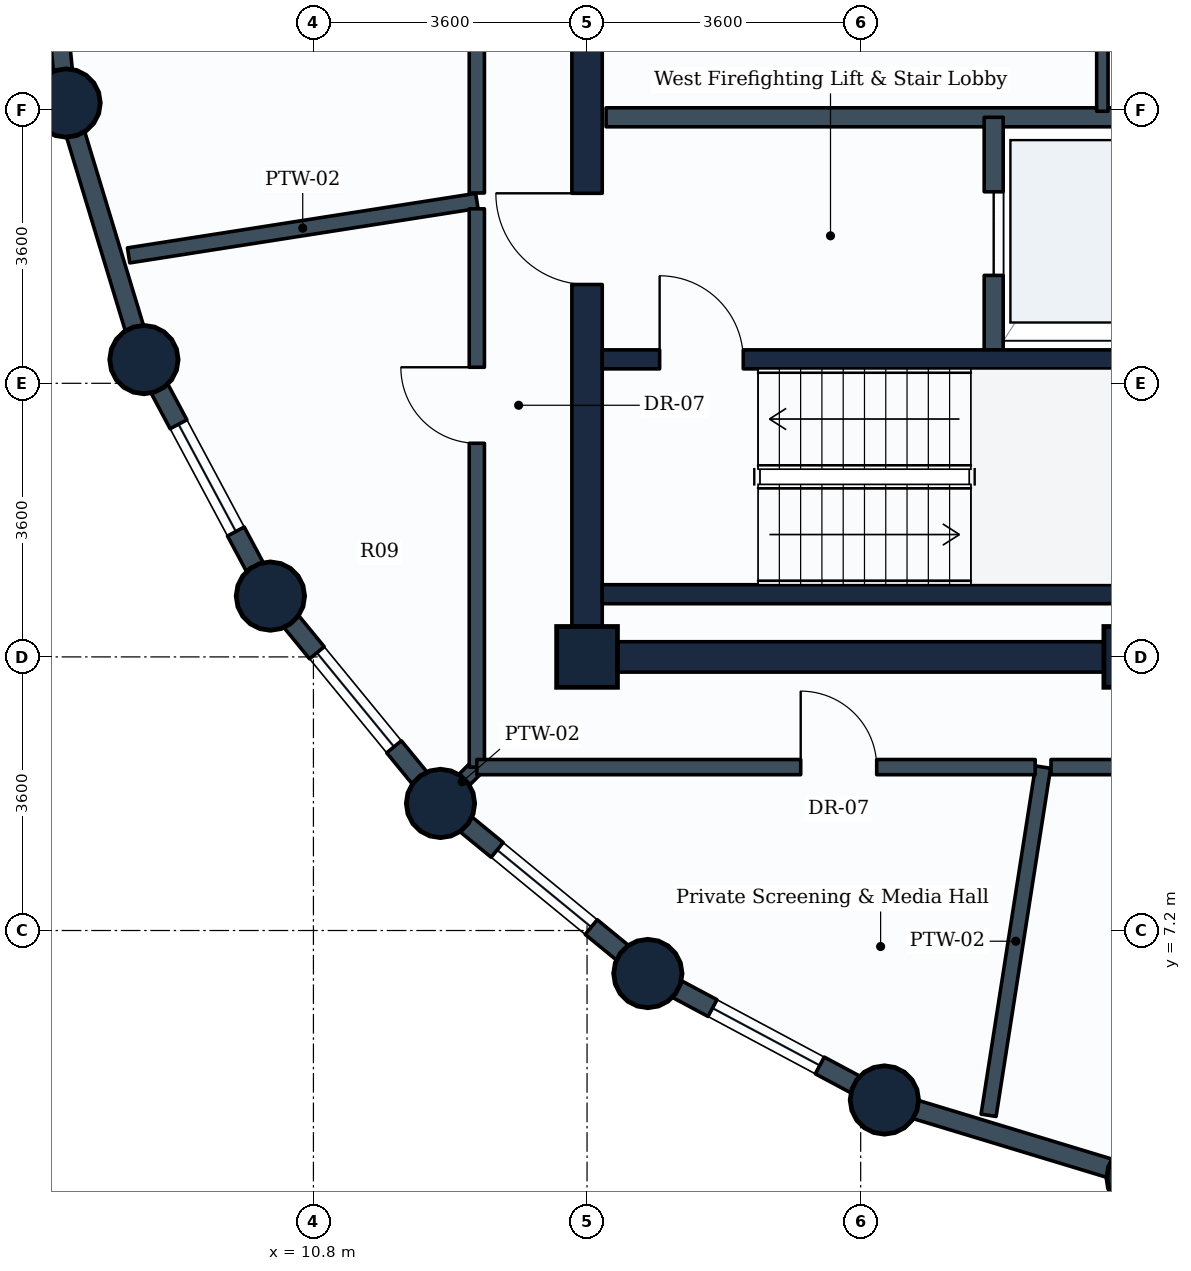
"""IFC4 building model, lengths in metres.
Left out: names, types, materials, properties, quantities, classifications, styles, units other than length and angle.
Written with IfcOpenShell. Run it as: python <this file> out.ifc"""

import sys

from ifc_helpers import new_model, si_unit, direction, frame, frame_2d, origin, origin_2d, place, context, subcontext, project, spatial, rectangle, circle, extrude, element, fill, save


model = new_model("IFC4")
c1 = context("Model", 3, precision=1e-05, world=origin(), true_north=direction((0.0, 1.0)))
c2 = subcontext(c1, "Body", "Model", "MODEL_VIEW")
j1 = project(units=[si_unit("LENGTHUNIT", "METRE"), si_unit("PLANEANGLEUNIT", "RADIAN")], contexts=[c1])
p1 = place(None, origin())
s1 = spatial("IfcSite", under=j1, at=p1, CompositionType="ELEMENT")
p2 = place(p1, origin())
s2 = spatial("IfcBuilding", under=s1, at=p2, CompositionType="ELEMENT")
p3 = place(p2, frame((0.0, 0.0, 224.6)))
s3 = spatial("IfcBuildingStorey", under=s2, at=p3, CompositionType="ELEMENT", Elevation=224.6)
for number, where, z_axis, x_axis in (
    (1, (7.546, 18.088, 0.0), (0.0, 0.0, 1.0), (1.0, 0.0, 0.0)),
    (2, (8.57, 14.712, 0.0), (0.0, 0.0, 1.0), (1.0, 0.0, 0.0)),
    (3, (10.234, 11.6, 0.0), (0.0, 0.0, 1.0), (1.0, 0.0, 0.0)),
    (4, (12.472, 8.872, 0.0), (0.0, 0.0, 1.0), (1.0, 0.0, 0.0)),
):
    element("IfcColumn", number, at=place(p3, frame(where, z_axis=z_axis, x_axis=x_axis)), inside=s3, PredefinedType="COLUMN", context=c2, shape_type="SweptSolid", body=[
        extrude(circle(Radius=0.45, at=origin_2d()), origin(), (0.0, 0.0, 1.0), 3.6),
    ])
p4 = place(p3, frame((14.4, 10.8, 0.0), z_axis=(0.0, 0.0, 1.0), x_axis=(1.0, 0.0, 0.0)))
e5 = element("IfcColumn", 5, at=p4, inside=s3, PredefinedType="COLUMN", context=c2, shape_type="SweptSolid", body=[
    extrude(rectangle(XDim=0.8, YDim=0.8, at=origin_2d()), origin(), (0.0, 0.0, 1.0), 3.6),
])
for number, where, z_axis, x_axis in (
    (6, (15.2, 6.634, 0.0), (0.0, 0.0, 1.0), (1.0, 0.0, 0.0)),
    (7, (18.312, 4.97, 0.0), (0.0, 0.0, 1.0), (1.0, 0.0, 0.0)),
):
    element("IfcColumn", number, at=place(p3, frame(where, z_axis=z_axis, x_axis=x_axis)), inside=s3, PredefinedType="COLUMN", context=c2, shape_type="SweptSolid", body=[
        extrude(circle(Radius=0.45, at=origin_2d()), origin(), (0.0, 0.0, 1.0), 3.6),
    ])
p5 = place(p3, frame((21.6, 10.8, 0.0), z_axis=(0.0, 0.0, 1.0), x_axis=(1.0, 0.0, 0.0)))
e8 = element("IfcColumn", 8, at=p5, inside=s3, PredefinedType="COLUMN", context=c2, shape_type="SweptSolid", body=[
    extrude(rectangle(XDim=0.8, YDim=0.8, at=origin_2d()), origin(), (0.0, 0.0, 1.0), 3.6),
])
p6 = place(p3, frame((21.688, 3.946, 0.0), z_axis=(0.0, 0.0, 1.0), x_axis=(1.0, 0.0, 0.0)))
e9 = element("IfcColumn", 9, at=p6, inside=s3, PredefinedType="COLUMN", context=c2, shape_type="SweptSolid", body=[
    extrude(circle(Radius=0.45, at=origin_2d()), origin(), (0.0, 0.0, 1.0), 3.6),
])
p7 = place(p3, frame((7.546, 18.088, 0.0), z_axis=(0.0, 0.0, 1.0), x_axis=(-0.09802417461, 0.995184033831, 0.0)))
e10 = element("IfcWall", 10, at=p7, inside=s3, PredefinedType="STANDARD", context=c2, shape_type="SweptSolid", body=[
    extrude(rectangle(XDim=3.529, YDim=0.25, at=frame_2d((1.765, 0.0))), origin(), (0.0, 0.0, 1.0), 2.83),
])
p8 = place(p7, frame((0.965, 0.0, 0.85)))
e11 = element("IfcOpeningElement", 11, at=p8, cuts=e10, PredefinedType="OPENING", context=c2, shape_type="SweptSolid", body=[
    extrude(rectangle(XDim=1.6, YDim=1.35, at=frame_2d((0.8, 0.675))), frame((0.0, 0.135, 0.0), z_axis=(0.0, -1.0, 0.0), x_axis=(1.0, 0.0, 0.0)), (0.0, 0.0, 1.0), 0.27),
])
p9 = place(p3, frame((8.57, 14.712, 0.0), z_axis=(0.0, 0.0, 1.0), x_axis=(-0.290305086481, 0.956934144423, 0.0)))
e12 = element("IfcWall", 12, at=p9, inside=s3, PredefinedType="STANDARD", context=c2, shape_type="SweptSolid", body=[
    extrude(rectangle(XDim=3.528, YDim=0.25, at=frame_2d((1.764, 0.0))), origin(), (0.0, 0.0, 1.0), 2.83),
])
p10 = place(p3, frame((10.234, 11.6, 0.0), z_axis=(0.0, 0.0, 1.0), x_axis=(-0.47151087309, 0.881860247748, 0.0)))
e13 = element("IfcWall", 13, at=p10, inside=s3, PredefinedType="STANDARD", context=c2, shape_type="SweptSolid", body=[
    extrude(rectangle(XDim=3.529, YDim=0.25, at=frame_2d((1.764, 0.0))), origin(), (0.0, 0.0, 1.0), 2.83),
])
p11 = place(p10, frame((0.964, 0.0, 0.85)))
e14 = element("IfcOpeningElement", 14, at=p11, cuts=e13, PredefinedType="OPENING", context=c2, shape_type="SweptSolid", body=[
    extrude(rectangle(XDim=1.6, YDim=1.35, at=frame_2d((0.8, 0.675))), frame((0.0, 0.135, 0.0), z_axis=(0.0, -1.0, 0.0), x_axis=(1.0, 0.0, 0.0)), (0.0, 0.0, 1.0), 0.27),
])
p12 = place(p3, frame((12.472, 8.872, 0.0), z_axis=(0.0, 0.0, 1.0), x_axis=(-0.634258295121, 0.773121216285, 0.0)))
e15 = element("IfcWall", 15, at=p12, inside=s3, PredefinedType="STANDARD", context=c2, shape_type="SweptSolid", body=[
    extrude(rectangle(XDim=3.529, YDim=0.25, at=frame_2d((1.764, 0.0))), origin(), (0.0, 0.0, 1.0), 2.83),
])
p13 = place(p12, frame((0.964, 0.0, 0.85)))
e16 = element("IfcOpeningElement", 16, at=p13, cuts=e15, PredefinedType="OPENING", context=c2, shape_type="SweptSolid", body=[
    extrude(rectangle(XDim=1.6, YDim=1.35, at=frame_2d((0.8, 0.675))), frame((0.0, 0.135, 0.0), z_axis=(0.0, -1.0, 0.0), x_axis=(1.0, 0.0, 0.0)), (0.0, 0.0, 1.0), 0.27),
])
p14 = place(p3, frame((15.2, 6.634, 0.0), z_axis=(0.0, 0.0, 1.0), x_axis=(-0.773121216285, 0.634258295121, 0.0)))
e17 = element("IfcWall", 17, at=p14, inside=s3, PredefinedType="STANDARD", context=c2, shape_type="SweptSolid", body=[
    extrude(rectangle(XDim=3.529, YDim=0.25, at=frame_2d((1.764, 0.0))), origin(), (0.0, 0.0, 1.0), 2.83),
])
p15 = place(p14, frame((0.964, 0.0, 0.85)))
e18 = element("IfcOpeningElement", 18, at=p15, cuts=e17, PredefinedType="OPENING", context=c2, shape_type="SweptSolid", body=[
    extrude(rectangle(XDim=1.6, YDim=1.35, at=frame_2d((0.8, 0.675))), frame((0.0, 0.135, 0.0), z_axis=(0.0, -1.0, 0.0), x_axis=(1.0, 0.0, 0.0)), (0.0, 0.0, 1.0), 0.27),
])
p16 = place(p3, frame((18.312, 4.97, 0.0), z_axis=(0.0, 0.0, 1.0), x_axis=(-0.881846862014, 0.471535907389, 0.0)))
e19 = element("IfcWall", 19, at=p16, inside=s3, PredefinedType="STANDARD", context=c2, shape_type="SweptSolid", body=[
    extrude(rectangle(XDim=3.529, YDim=0.25, at=frame_2d((1.765, 0.0))), origin(), (0.0, 0.0, 1.0), 2.83),
])
p17 = place(p16, frame((0.964, 0.0, 0.85)))
e20 = element("IfcOpeningElement", 20, at=p17, cuts=e19, PredefinedType="OPENING", context=c2, shape_type="SweptSolid", body=[
    extrude(rectangle(XDim=1.6, YDim=1.35, at=frame_2d((0.8, 0.675))), frame((0.0, 0.135, 0.0), z_axis=(0.0, -1.0, 0.0), x_axis=(1.0, 0.0, 0.0)), (0.0, 0.0, 1.0), 0.27),
])
p18 = place(p3, frame((21.688, 3.946, 0.0), z_axis=(0.0, 0.0, 1.0), x_axis=(-0.956953367403, 0.290241714123, 0.0)))
e21 = element("IfcWall", 21, at=p18, inside=s3, PredefinedType="STANDARD", context=c2, shape_type="SweptSolid", body=[
    extrude(rectangle(XDim=3.528, YDim=0.25, at=frame_2d((1.764, 0.0))), origin(), (0.0, 0.0, 1.0), 2.83),
])
p19 = place(p3, frame((14.4, 10.8, 0.0), z_axis=(0.0, 0.0, 1.0), x_axis=(1.0, 0.0, 0.0)))
e22 = element("IfcWall", 22, at=p19, inside=s3, PredefinedType="SHEAR", context=c2, shape_type="SweptSolid", body=[
    extrude(rectangle(XDim=18.0, YDim=0.4, at=frame_2d((9.0, 0.0))), origin(), (0.0, 0.0, 1.0), 3.35),
])
p20 = place(p3, frame((14.4, 10.8, 0.0), z_axis=(0.0, 0.0, 1.0), x_axis=(0.0, 1.0, 0.0)))
e23 = element("IfcWall", 23, at=p20, inside=s3, PredefinedType="SHEAR", context=c2, shape_type="SweptSolid", body=[
    extrude(rectangle(XDim=14.4, YDim=0.4, at=frame_2d((7.2, 0.0))), origin(), (0.0, 0.0, 1.0), 3.35),
])
p21 = place(p20, frame((11.05, 0.0, 0.0)))
e24 = element("IfcOpeningElement", 24, at=p21, cuts=e23, PredefinedType="OPENING", context=c2, shape_type="SweptSolid", body=[
    extrude(rectangle(XDim=1.1, YDim=2.1, at=frame_2d((0.55, 1.05))), frame((0.0, 0.21, 0.0), z_axis=(0.0, -1.0, 0.0), x_axis=(1.0, 0.0, 0.0)), (0.0, 0.0, 1.0), 0.42),
])
p22 = place(p20, frame((4.9, 0.0, 0.0)))
e25 = element("IfcOpeningElement", 25, at=p22, cuts=e23, PredefinedType="OPENING", context=c2, shape_type="SweptSolid", body=[
    extrude(rectangle(XDim=1.2, YDim=2.1, at=frame_2d((0.6, 1.05))), frame((0.0, 0.21, 0.0), z_axis=(0.0, -1.0, 0.0), x_axis=(1.0, 0.0, 0.0)), (0.0, 0.0, 1.0), 0.42),
])
p23 = place(p20, frame((8.15, 0.0, 0.0)))
e26 = element("IfcOpeningElement", 26, at=p23, cuts=e23, PredefinedType="OPENING", context=c2, shape_type="SweptSolid", body=[
    extrude(rectangle(XDim=0.9, YDim=2.1, at=frame_2d((0.45, 1.05))), frame((0.0, 0.21, 0.0), z_axis=(0.0, -1.0, 0.0), x_axis=(1.0, 0.0, 0.0)), (0.0, 0.0, 1.0), 0.42),
])
p24 = place(p3, frame((14.6, 11.625, 0.0), z_axis=(0.0, 0.0, 1.0), x_axis=(1.0, 0.0, 0.0)))
e27 = element("IfcWall", 27, at=p24, inside=s3, PredefinedType="SHEAR", context=c2, shape_type="SweptSolid", body=[
    extrude(rectangle(XDim=8.75, YDim=0.25, at=frame_2d((4.375, 0.0))), origin(), (0.0, 0.0, 1.0), 3.35),
])
p25 = place(p3, frame((14.6, 14.715, 0.0), z_axis=(0.0, 0.0, 1.0), x_axis=(1.0, 0.0, 0.0)))
e28 = element("IfcWall", 28, at=p25, inside=s3, PredefinedType="SHEAR", context=c2, shape_type="SweptSolid", body=[
    extrude(rectangle(XDim=8.75, YDim=0.25, at=frame_2d((4.375, 0.0))), origin(), (0.0, 0.0, 1.0), 3.35),
])
p26 = place(p25, frame((0.755, 0.0, 0.0)))
e29 = element("IfcOpeningElement", 29, at=p26, cuts=e28, PredefinedType="OPENING", context=c2, shape_type="SweptSolid", body=[
    extrude(rectangle(XDim=1.1, YDim=2.1, at=frame_2d((0.55, 1.05))), frame((0.0, 0.135, 0.0), z_axis=(0.0, -1.0, 0.0), x_axis=(1.0, 0.0, 0.0)), (0.0, 0.0, 1.0), 0.27),
])
p27 = place(p3, frame((14.65, 17.9, 0.0), z_axis=(0.0, 0.0, 1.0), x_axis=(1.0, 0.0, 0.0)))
e30 = element("IfcWall", 30, at=p27, inside=s3, PredefinedType="PARTITIONING", context=c2, shape_type="SweptSolid", body=[
    extrude(rectangle(XDim=7.15, YDim=0.25, at=frame_2d((3.575, 0.0))), origin(), (0.0, 0.0, 1.0), 3.335),
])
p28 = place(p3, frame((19.75, 14.84, 0.0), z_axis=(0.0, 0.0, 1.0), x_axis=(0.0, 1.0, 0.0)))
e31 = element("IfcWall", 31, at=p28, inside=s3, PredefinedType="PARTITIONING", context=c2, shape_type="SweptSolid", body=[
    extrude(rectangle(XDim=3.06, YDim=0.25, at=frame_2d((1.53, 0.0))), origin(), (0.0, 0.0, 1.0), 3.335),
])
p29 = place(p28, frame((0.98, 0.0, 0.0)))
e32 = element("IfcOpeningElement", 32, at=p29, cuts=e31, PredefinedType="OPENING", context=c2, shape_type="SweptSolid", body=[
    extrude(rectangle(XDim=1.1, YDim=2.1, at=frame_2d((0.55, 1.05))), frame((0.0, 0.135, 0.0), z_axis=(0.0, -1.0, 0.0), x_axis=(1.0, 0.0, 0.0)), (0.0, 0.0, 1.0), 0.27),
])
p30 = place(p3, frame((21.18, 17.98, 0.0), z_axis=(0.0, 0.0, 1.0), x_axis=(0.0, 1.0, 0.0)))
e33 = element("IfcWall", 33, at=p30, inside=s3, PredefinedType="PARTITIONING", context=c2, shape_type="SweptSolid", body=[
    extrude(rectangle(XDim=3.42, YDim=0.15, at=frame_2d((1.71, 0.0))), origin(), (0.0, 0.0, 1.0), 3.335),
])
p31 = place(p3, frame((12.95, 16.8, 0.0), z_axis=(0.0, 0.0, 1.0), x_axis=(-0.9879733582, -0.154624200844, 0.0)))
e34 = element("IfcWall", 34, at=p31, inside=s3, PredefinedType="PARTITIONING", context=c2, shape_type="SweptSolid", body=[
    extrude(rectangle(XDim=4.637, YDim=0.2, at=frame_2d((2.319, 0.0))), origin(), (0.0, 0.0, 1.0), 2.83),
])
p32 = place(p3, frame((12.95, 9.35, 0.0), z_axis=(0.0, 0.0, 1.0), x_axis=(-0.706883613527, -0.707329878435, 0.0)))
e35 = element("IfcWall", 35, at=p32, inside=s3, PredefinedType="PARTITIONING", context=c2, shape_type="SweptSolid", body=[
    extrude(rectangle(XDim=0.547, YDim=0.2, at=frame_2d((0.273, 0.0))), origin(), (0.0, 0.0, 1.0), 3.02),
])
p33 = place(p3, frame((20.4, 9.35, 0.0), z_axis=(0.0, 0.0, 1.0), x_axis=(-0.154564772307, -0.987982657318, 0.0)))
e36 = element("IfcWall", 36, at=p33, inside=s3, PredefinedType="PARTITIONING", context=c2, shape_type="SweptSolid", body=[
    extrude(rectangle(XDim=4.637, YDim=0.2, at=frame_2d((2.319, 0.0))), origin(), (0.0, 0.0, 1.0), 2.83),
])
p34 = place(p3, frame((12.95, 16.904, 0.0), z_axis=(0.0, 0.0, 1.0), x_axis=(0.0, 1.0, 0.0)))
e37 = element("IfcWall", 37, at=p34, inside=s3, PredefinedType="PARTITIONING", context=c2, shape_type="SweptSolid", body=[
    extrude(rectangle(XDim=8.217, YDim=0.2, at=frame_2d((4.108, 0.0))), origin(), (0.0, 0.0, 1.0), 3.02),
])
p35 = place(p34, frame((3.596, 0.0, 0.0)))
e38 = element("IfcOpeningElement", 38, at=p35, cuts=e37, PredefinedType="OPENING", context=c2, shape_type="SweptSolid", body=[
    extrude(rectangle(XDim=1.0, YDim=2.1, at=frame_2d((0.5, 1.05))), frame((0.0, 0.11, 0.0), z_axis=(0.0, -1.0, 0.0), x_axis=(1.0, 0.0, 0.0)), (0.0, 0.0, 1.0), 0.22),
])
p36 = place(p3, frame((12.95, 9.35, 0.0), z_axis=(0.0, 0.0, 1.0), x_axis=(0.0, 1.0, 0.0)))
e39 = element("IfcWall", 39, at=p36, inside=s3, PredefinedType="PARTITIONING", context=c2, shape_type="SweptSolid", body=[
    extrude(rectangle(XDim=7.346, YDim=0.2, at=frame_2d((3.673, 0.0))), origin(), (0.0, 0.0, 1.0), 3.02),
])
p37 = place(p36, frame((4.261, 0.0, 0.0)))
e40 = element("IfcOpeningElement", 40, at=p37, cuts=e39, PredefinedType="OPENING", context=c2, shape_type="SweptSolid", body=[
    extrude(rectangle(XDim=1.0, YDim=2.1, at=frame_2d((0.5, 1.05))), frame((0.0, 0.11, 0.0), z_axis=(0.0, -1.0, 0.0), x_axis=(1.0, 0.0, 0.0)), (0.0, 0.0, 1.0), 0.22),
])
p38 = place(p3, frame((12.95, 9.35, 0.0), z_axis=(0.0, 0.0, 1.0), x_axis=(1.0, 0.0, 0.0)))
e41 = element("IfcWall", 41, at=p38, inside=s3, PredefinedType="PARTITIONING", context=c2, shape_type="SweptSolid", body=[
    extrude(rectangle(XDim=7.346, YDim=0.2, at=frame_2d((3.673, 0.0))), origin(), (0.0, 0.0, 1.0), 3.02),
])
p39 = place(p38, frame((4.261, 0.0, 0.0)))
e42 = element("IfcOpeningElement", 42, at=p39, cuts=e41, PredefinedType="OPENING", context=c2, shape_type="SweptSolid", body=[
    extrude(rectangle(XDim=1.0, YDim=2.1, at=frame_2d((0.5, 1.05))), frame((0.0, 0.11, 0.0), z_axis=(0.0, -1.0, 0.0), x_axis=(1.0, 0.0, 0.0)), (0.0, 0.0, 1.0), 0.22),
])
p40 = place(p3, frame((20.504, 9.35, 0.0), z_axis=(0.0, 0.0, 1.0), x_axis=(1.0, 0.0, 0.0)))
e43 = element("IfcWall", 43, at=p40, inside=s3, PredefinedType="PARTITIONING", context=c2, shape_type="SweptSolid", body=[
    extrude(rectangle(XDim=8.217, YDim=0.2, at=frame_2d((4.108, 0.0))), origin(), (0.0, 0.0, 1.0), 3.02),
])
p41 = place(p40, frame((3.914, 0.0, 0.0)))
e44 = element("IfcOpeningElement", 44, at=p41, cuts=e43, PredefinedType="OPENING", context=c2, shape_type="SweptSolid", body=[
    extrude(rectangle(XDim=1.0, YDim=2.1, at=frame_2d((0.5, 1.05))), frame((0.0, 0.11, 0.0), z_axis=(0.0, -1.0, 0.0), x_axis=(1.0, 0.0, 0.0)), (0.0, 0.0, 1.0), 0.22),
])
p42 = place(p11, origin())
e45 = element("IfcWindow", 45, at=p42, inside=s3, PartitioningType="SINGLE_PANEL", PredefinedType="WINDOW", context=c2, shape_type="SweptSolid", body=[
    extrude(rectangle(XDim=1.6, YDim=1.35, at=frame_2d((0.8, 0.675))), frame((0.0, 0.03, 0.0), z_axis=(0.0, -1.0, 0.0), x_axis=(1.0, 0.0, 0.0)), (0.0, 0.0, 1.0), 0.06),
])
fill(e14, e45)
p43 = place(p13, origin())
e46 = element("IfcWindow", 46, at=p43, inside=s3, PartitioningType="SINGLE_PANEL", PredefinedType="WINDOW", context=c2, shape_type="SweptSolid", body=[
    extrude(rectangle(XDim=1.6, YDim=1.35, at=frame_2d((0.8, 0.675))), frame((0.0, 0.03, 0.0), z_axis=(0.0, -1.0, 0.0), x_axis=(1.0, 0.0, 0.0)), (0.0, 0.0, 1.0), 0.06),
])
fill(e16, e46)
p44 = place(p15, origin())
e47 = element("IfcWindow", 47, at=p44, inside=s3, PartitioningType="SINGLE_PANEL", PredefinedType="WINDOW", context=c2, shape_type="SweptSolid", body=[
    extrude(rectangle(XDim=1.6, YDim=1.35, at=frame_2d((0.8, 0.675))), frame((0.0, 0.03, 0.0), z_axis=(0.0, -1.0, 0.0), x_axis=(1.0, 0.0, 0.0)), (0.0, 0.0, 1.0), 0.06),
])
fill(e18, e47)
p45 = place(p17, origin())
e48 = element("IfcWindow", 48, at=p45, inside=s3, PartitioningType="SINGLE_PANEL", PredefinedType="WINDOW", context=c2, shape_type="SweptSolid", body=[
    extrude(rectangle(XDim=1.6, YDim=1.35, at=frame_2d((0.8, 0.675))), frame((0.0, 0.03, 0.0), z_axis=(0.0, -1.0, 0.0), x_axis=(1.0, 0.0, 0.0)), (0.0, 0.0, 1.0), 0.06),
])
fill(e20, e48)
p46 = place(p26, origin())
e49 = element("IfcDoor", 49, at=p46, inside=s3, OperationType="SINGLE_SWING_LEFT", PredefinedType="DOOR", context=c2, shape_type="SweptSolid", body=[
    extrude(rectangle(XDim=1.1, YDim=2.1, at=frame_2d((0.55, 1.05))), frame((0.0, 0.025, 0.0), z_axis=(0.0, -1.0, 0.0), x_axis=(1.0, 0.0, 0.0)), (0.0, 0.0, 1.0), 0.05),
])
fill(e29, e49)
p47 = place(p29, origin())
e50 = element("IfcDoor", 50, at=p47, inside=s3, OperationType="SLIDING_TO_LEFT", PredefinedType="DOOR", context=c2, shape_type="SweptSolid", body=[
    extrude(rectangle(XDim=1.1, YDim=2.1, at=frame_2d((0.55, 1.05))), frame((0.0, 0.025, 0.0), z_axis=(0.0, -1.0, 0.0), x_axis=(1.0, 0.0, 0.0)), (0.0, 0.0, 1.0), 0.05),
])
fill(e32, e50)
p48 = place(p22, origin())
e51 = element("IfcDoor", 51, at=p48, inside=s3, OperationType="SINGLE_SWING_RIGHT", PredefinedType="DOOR", context=c2, shape_type="SweptSolid", body=[
    extrude(rectangle(XDim=1.2, YDim=2.1, at=frame_2d((0.6, 1.05))), frame((0.0, 0.025, 0.0), z_axis=(0.0, -1.0, 0.0), x_axis=(1.0, 0.0, 0.0)), (0.0, 0.0, 1.0), 0.05),
])
fill(e25, e51)
p49 = place(p37, origin())
e52 = element("IfcDoor", 52, at=p49, inside=s3, OperationType="SINGLE_SWING_RIGHT", PredefinedType="DOOR", context=c2, shape_type="SweptSolid", body=[
    extrude(rectangle(XDim=1.0, YDim=2.1, at=frame_2d((0.5, 1.05))), frame((0.0, 0.025, 0.0), z_axis=(0.0, -1.0, 0.0), x_axis=(1.0, 0.0, 0.0)), (0.0, 0.0, 1.0), 0.05),
])
fill(e40, e52)
p50 = place(p39, origin())
e53 = element("IfcDoor", 53, at=p50, inside=s3, OperationType="SINGLE_SWING_LEFT", PredefinedType="DOOR", context=c2, shape_type="SweptSolid", body=[
    extrude(rectangle(XDim=1.0, YDim=2.1, at=frame_2d((0.5, 1.05))), frame((0.0, 0.025, 0.0), z_axis=(0.0, -1.0, 0.0), x_axis=(1.0, 0.0, 0.0)), (0.0, 0.0, 1.0), 0.05),
])
fill(e42, e53)
save(model, sys.argv[1])
